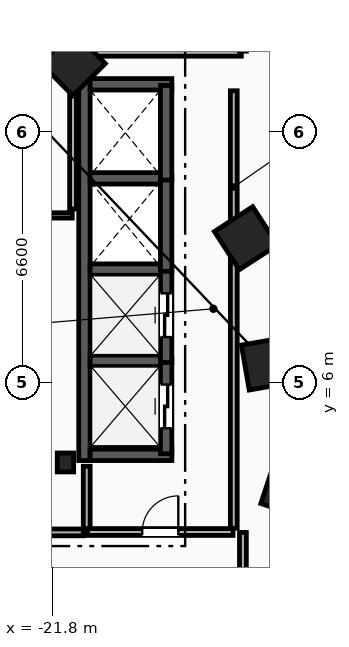
"""IFC4 building model, lengths in metres.
Left out: names, types, materials, properties, quantities, classifications, styles, units other than length and angle.
Written with IfcOpenShell. Run it as: python <this file> out.ifc"""

import sys

from ifc_helpers import new_model, si_unit, direction, frame, frame_2d, origin, origin_2d, place, context, subcontext, project, spatial, rectangle, i_section, extrude, element, fill, save


model = new_model("IFC4")
c1 = context("Model", 3, precision=1e-05, world=origin(), true_north=direction((0.0, 1.0)))
c2 = subcontext(c1, "Body", "Model", "MODEL_VIEW")
j1 = project(units=[si_unit("LENGTHUNIT", "METRE"), si_unit("PLANEANGLEUNIT", "RADIAN")], contexts=[c1])
p1 = place(None, origin())
s1 = spatial("IfcSite", under=j1, at=p1, CompositionType="ELEMENT")
p2 = place(p1, origin())
s2 = spatial("IfcBuilding", under=s1, at=p2, CompositionType="ELEMENT")
p3 = place(p2, frame((0.0, 0.0, 39.2)))
s3 = spatial("IfcBuildingStorey", under=s2, at=p3, CompositionType="ELEMENT", Elevation=39.2)
p4 = place(p3, frame((-21.45, 3.9, 0.0), z_axis=(0.0, 0.0, 1.0), x_axis=(1.0, 0.0, 0.0)))
e1 = element("IfcColumn", 1, at=p4, inside=s3, PredefinedType="COLUMN", context=c2, shape_type="SweptSolid", body=[
    extrude(i_section(OverallWidth=0.432, OverallDepth=0.498, WebThickness=0.056, FlangeThickness=0.089, FilletRadius=0.018, at=origin_2d()), origin(), (0.0, 0.0, 1.0), 3.8),
])
for number, where, z_axis, x_axis in (
    (2, (-15.55, 3.2, 0.0), (0.0, 0.0, 1.0), (0.315, 0.949, 0.0)),
    (3, (-16.125, 6.5, 0.0), (0.0, 0.0, 1.0), (-0.172, 0.985, 0.0)),
    (4, (-16.7, 9.8, 0.0), (0.0, 0.0, 1.0), (-0.544, 0.839, 0.0)),
    (5, (-21.25, 14.4, 0.0), (0.0, 0.0, 1.0), (-0.703, 0.711, 0.0)),
):
    element("IfcColumn", number, at=place(p3, frame(where, z_axis=z_axis, x_axis=x_axis)), inside=s3, PredefinedType="COLUMN", context=c2, shape_type="SweptSolid", body=[
        extrude(rectangle(XDim=1.2, YDim=1.2, at=origin_2d()), origin(), (0.0, 0.0, 1.0), 3.8),
    ])
p5 = place(p3, frame((-20.89, 2.15, 0.0), z_axis=(0.0, 0.0, 1.0), x_axis=(0.0, 1.0, 0.0)))
e6 = element("IfcWall", 6, at=p5, inside=s3, PredefinedType="PARTITIONING", context=c2, shape_type="SweptSolid", body=[
    extrude(rectangle(XDim=1.65, YDim=0.18, at=frame_2d((0.825, 0.0))), origin(), (0.0, 0.0, 1.0), 3.5),
])
p6 = place(p3, frame((-23.98, 2.06, 0.0), z_axis=(0.0, 0.0, 1.0), x_axis=(1.0, 0.0, 0.0)))
e7 = element("IfcWall", 7, at=p6, inside=s3, PredefinedType="PARTITIONING", context=c2, shape_type="SweptSolid", body=[
    extrude(rectangle(XDim=3.0, YDim=0.18, at=frame_2d((1.5, 0.0))), origin(), (0.0, 0.0, 1.0), 3.5),
])
p7 = place(p6, frame((0.9, 0.0, 0.0)))
e8 = element("IfcOpeningElement", 8, at=p7, cuts=e7, PredefinedType="OPENING", context=c2, shape_type="SweptSolid", body=[
    extrude(rectangle(XDim=1.2, YDim=2.15, at=frame_2d((0.6, 1.075))), frame((0.0, 0.1, 0.0), z_axis=(0.0, -1.0, 0.0), x_axis=(1.0, 0.0, 0.0)), (0.0, 0.0, 1.0), 0.2),
])
p8 = place(p3, frame((-20.95, 3.95, 0.0), z_axis=(0.0, 0.0, 1.0), x_axis=(0.0, 1.0, 0.0)))
e9 = element("IfcWall", 9, at=p8, inside=s3, PredefinedType="SHEAR", context=c2, shape_type="SweptSolid", body=[
    extrude(rectangle(XDim=10.05, YDim=0.3, at=frame_2d((5.025, 0.0))), origin(), (0.0, 0.0, 1.0), 3.5),
])
for number, where, z_axis, x_axis in (
    (10, (-20.8, 4.1, 0.0), (0.0, 0.0, 1.0), (1.0, 0.0, 0.0)),
    (11, (-20.8, 13.85, 0.0), (0.0, 0.0, 1.0), (1.0, 0.0, 0.0)),
):
    element("IfcWall", number, at=place(p3, frame(where, z_axis=z_axis, x_axis=x_axis)), inside=s3, PredefinedType="SHEAR", context=c2, shape_type="SweptSolid", body=[
        extrude(rectangle(XDim=2.15, YDim=0.3, at=frame_2d((1.075, 0.0))), origin(), (0.0, 0.0, 1.0), 3.5),
    ])
for number, where, z_axis, x_axis in (
    (12, (-20.8, 6.575, 0.0), (0.0, 0.0, 1.0), (1.0, 0.0, 0.0)),
    (13, (-20.8, 8.975, 0.0), (0.0, 0.0, 1.0), (1.0, 0.0, 0.0)),
    (14, (-20.8, 11.375, 0.0), (0.0, 0.0, 1.0), (1.0, 0.0, 0.0)),
):
    element("IfcWall", number, at=place(p3, frame(where, z_axis=z_axis, x_axis=x_axis)), inside=s3, PredefinedType="SHEAR", context=c2, shape_type="SweptSolid", body=[
        extrude(rectangle(XDim=1.85, YDim=0.3, at=frame_2d((0.925, 0.0))), origin(), (0.0, 0.0, 1.0), 3.5),
    ])
p9 = place(p3, frame((-18.8, 4.13, 0.0), z_axis=(0.0, 0.0, 1.0), x_axis=(0.0, 1.0, 0.0)))
e15 = element("IfcWall", 15, at=p9, inside=s3, PredefinedType="SHEAR", context=c2, shape_type="SweptSolid", body=[
    extrude(rectangle(XDim=2.49, YDim=0.3, at=frame_2d((1.245, 0.0))), origin(), (0.0, 0.0, 1.0), 3.5),
])
p10 = place(p9, frame((0.67, 0.0, 0.0)))
e16 = element("IfcOpeningElement", 16, at=p10, cuts=e15, PredefinedType="OPENING", context=c2, shape_type="SweptSolid", body=[
    extrude(rectangle(XDim=1.15, YDim=2.2, at=frame_2d((0.575, 1.1))), frame((0.0, 0.16, 0.0), z_axis=(0.0, -1.0, 0.0), x_axis=(1.0, 0.0, 0.0)), (0.0, 0.0, 1.0), 0.32),
])
p11 = place(p3, frame((-18.8, 6.53, 0.0), z_axis=(0.0, 0.0, 1.0), x_axis=(0.0, 1.0, 0.0)))
e17 = element("IfcWall", 17, at=p11, inside=s3, PredefinedType="SHEAR", context=c2, shape_type="SweptSolid", body=[
    extrude(rectangle(XDim=2.49, YDim=0.3, at=frame_2d((1.245, 0.0))), origin(), (0.0, 0.0, 1.0), 3.5),
])
p12 = place(p11, frame((0.67, 0.0, 0.0)))
e18 = element("IfcOpeningElement", 18, at=p12, cuts=e17, PredefinedType="OPENING", context=c2, shape_type="SweptSolid", body=[
    extrude(rectangle(XDim=1.15, YDim=2.2, at=frame_2d((0.575, 1.1))), frame((0.0, 0.16, 0.0), z_axis=(0.0, -1.0, 0.0), x_axis=(1.0, 0.0, 0.0)), (0.0, 0.0, 1.0), 0.32),
])
for number, where, z_axis, x_axis in (
    (19, (-18.8, 8.93, 0.0), (0.0, 0.0, 1.0), (0.0, 1.0, 0.0)),
    (20, (-18.8, 11.33, 0.0), (0.0, 0.0, 1.0), (0.0, 1.0, 0.0)),
):
    element("IfcWall", number, at=place(p3, frame(where, z_axis=z_axis, x_axis=x_axis)), inside=s3, PredefinedType="SHEAR", context=c2, shape_type="SweptSolid", body=[
        extrude(rectangle(XDim=2.49, YDim=0.3, at=frame_2d((1.245, 0.0))), origin(), (0.0, 0.0, 1.0), 3.5),
    ])
p13 = place(p3, frame((-17.02, 2.17, 0.0), z_axis=(0.0, 0.0, 1.0), x_axis=(0.0, 1.0, 0.0)))
e21 = element("IfcWall", 21, at=p13, inside=s3, PredefinedType="PARTITIONING", context=c2, shape_type="SweptSolid", body=[
    extrude(rectangle(XDim=11.51, YDim=0.18, at=frame_2d((5.755, 0.0))), origin(), (0.0, 0.0, 1.0), 3.5),
])
p14 = place(p3, frame((-20.87, 2.07, 0.0), z_axis=(0.0, 0.0, 1.0), x_axis=(1.0, 0.0, 0.0)))
e22 = element("IfcWall", 22, at=p14, inside=s3, PredefinedType="PARTITIONING", context=c2, shape_type="SweptSolid", body=[
    extrude(rectangle(XDim=3.83, YDim=0.18, at=frame_2d((1.915, 0.0))), origin(), (0.0, 0.0, 1.0), 3.5),
])
p15 = place(p14, frame((1.44, 0.0, 0.0)))
e23 = element("IfcOpeningElement", 23, at=p15, cuts=e22, PredefinedType="OPENING", context=c2, shape_type="SweptSolid", body=[
    extrude(rectangle(XDim=0.95, YDim=2.1, at=frame_2d((0.475, 1.05))), frame((0.0, 0.1, 0.0), z_axis=(0.0, -1.0, 0.0), x_axis=(1.0, 0.0, 0.0)), (0.0, 0.0, 1.0), 0.2),
])
p16 = place(p3, frame((-21.86, 10.4, 0.0), z_axis=(0.0, 0.0, 1.0), x_axis=(1.0, 0.0, 0.0)))
e24 = element("IfcWall", 24, at=p16, inside=s3, PredefinedType="PARTITIONING", context=c2, shape_type="SweptSolid", body=[
    extrude(rectangle(XDim=0.59, YDim=0.14, at=frame_2d((0.295, 0.0))), origin(), (0.0, 0.0, 1.0), 3.5),
])
p17 = place(p3, frame((-21.25, 10.57, 0.0), z_axis=(0.0, 0.0, 1.0), x_axis=(0.0, 1.0, 0.0)))
e25 = element("IfcWall", 25, at=p17, inside=s3, PredefinedType="PARTITIONING", context=c2, shape_type="SweptSolid", body=[
    extrude(rectangle(XDim=4.36, YDim=0.18, at=frame_2d((2.18, 0.0))), origin(), (0.0, 0.0, 1.0), 3.5),
])
p18 = place(p3, frame((-21.178, 14.68, 0.0), z_axis=(0.0, 0.0, 1.0), x_axis=(1.0, 0.0, 0.0)))
e26 = element("IfcWall", 26, at=p18, inside=s3, PredefinedType="PARTITIONING", context=c2, shape_type="SweptSolid", body=[
    extrude(rectangle(XDim=4.357, YDim=0.18, at=frame_2d((2.178, 0.0))), origin(), (0.0, 0.0, 1.0), 3.5),
])
p19 = place(p3, frame((-16.78, -0.329, 0.0), z_axis=(0.0, 0.0, 1.0), x_axis=(0.0, 1.0, 0.0)))
e27 = element("IfcWall", 27, at=p19, inside=s3, PredefinedType="PARTITIONING", context=c2, shape_type="SweptSolid", body=[
    extrude(rectangle(XDim=2.387, YDim=0.18, at=frame_2d((1.194, 0.0))), origin(), (0.0, 0.0, 1.0), 3.5),
])
p20 = place(p10, origin())
e28 = element("IfcDoor", 28, at=p20, inside=s3, OperationType="SLIDING_TO_LEFT", PredefinedType="TRAPDOOR", context=c2, shape_type="SweptSolid", body=[
    extrude(rectangle(XDim=1.15, YDim=2.2, at=frame_2d((0.575, 1.1))), frame((0.0, 0.025, 0.0), z_axis=(0.0, -1.0, 0.0), x_axis=(1.0, 0.0, 0.0)), (0.0, 0.0, 1.0), 0.05),
])
fill(e16, e28)
p21 = place(p12, origin())
e29 = element("IfcDoor", 29, at=p21, inside=s3, OperationType="SLIDING_TO_LEFT", PredefinedType="TRAPDOOR", context=c2, shape_type="SweptSolid", body=[
    extrude(rectangle(XDim=1.15, YDim=2.2, at=frame_2d((0.575, 1.1))), frame((0.0, 0.025, 0.0), z_axis=(0.0, -1.0, 0.0), x_axis=(1.0, 0.0, 0.0)), (0.0, 0.0, 1.0), 0.05),
])
fill(e18, e29)
p22 = place(p15, origin())
e30 = element("IfcDoor", 30, at=p22, inside=s3, OperationType="SINGLE_SWING_RIGHT", PredefinedType="DOOR", context=c2, shape_type="SweptSolid", body=[
    extrude(rectangle(XDim=0.95, YDim=2.1, at=frame_2d((0.475, 1.05))), frame((0.0, 0.025, 0.0), z_axis=(0.0, -1.0, 0.0), x_axis=(1.0, 0.0, 0.0)), (0.0, 0.0, 1.0), 0.05),
])
fill(e23, e30)
save(model, sys.argv[1])
